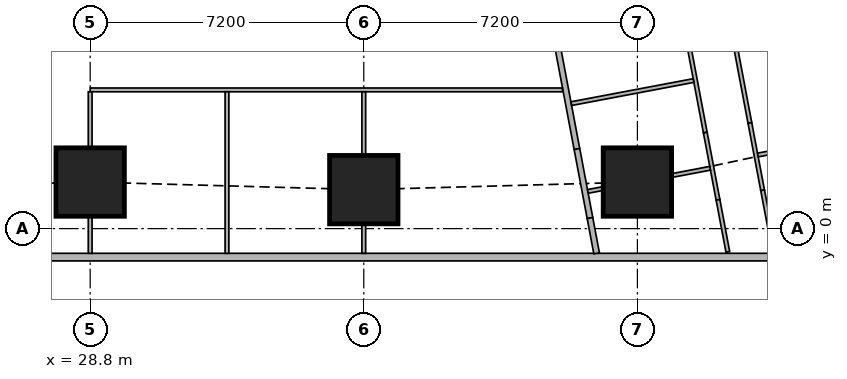
"""IFC4 building model, lengths in metres.
Left out: names, types, materials, properties, quantities, classifications, styles, units other than length and angle.
Written with IfcOpenShell. Run it as: python <this file> out.ifc"""

import sys

from ifc_helpers import new_model, si_unit, direction, frame, frame_2d, origin, origin_2d, place, context, subcontext, project, spatial, rectangle, extrude, element, fill, save


model = new_model("IFC4")
c1 = context("Model", 3, precision=1e-05, world=origin(), true_north=direction((0.0, 1.0)))
c2 = subcontext(c1, "Body", "Model", "MODEL_VIEW")
j1 = project(units=[si_unit("LENGTHUNIT", "METRE"), si_unit("PLANEANGLEUNIT", "RADIAN")], contexts=[c1])
p1 = place(None, origin())
s1 = spatial("IfcSite", under=j1, at=p1, CompositionType="ELEMENT")
p2 = place(p1, origin())
s2 = spatial("IfcBuilding", under=s1, at=p2, CompositionType="ELEMENT")
p3 = place(p2, frame((0.0, 0.0, 147.05)))
s3 = spatial("IfcBuildingStorey", under=s2, at=p3, CompositionType="ELEMENT", Elevation=147.05)
for number, where, z_axis, x_axis in (
    (1, (28.8, 1.225, 0.0), (0.0, 0.0, 1.0), (1.0, 0.0, 0.0)),
    (2, (36.0, 1.025, 0.0), (0.0, 0.0, 1.0), (1.0, 0.0, 0.0)),
    (3, (43.2, 1.225, 0.0), (0.0, 0.0, 1.0), (1.0, 0.0, 0.0)),
):
    element("IfcColumn", number, at=place(p3, frame(where, z_axis=z_axis, x_axis=x_axis)), inside=s3, PredefinedType="COLUMN", context=c2, shape_type="SweptSolid", body=[
        extrude(rectangle(XDim=1.8, YDim=1.8, at=origin_2d()), origin(), (0.0, 0.0, 1.0), 3.75),
    ])
p4 = place(p3, frame((2.163, -0.75, 0.0), z_axis=(0.0, 0.0, 1.0), x_axis=(1.0, 0.0, 0.0)))
e4 = element("IfcWall", 4, at=p4, inside=s3, PredefinedType="SOLIDWALL", context=c2, shape_type="SweptSolid", body=[
    extrude(rectangle(XDim=45.628, YDim=0.2, at=frame_2d((22.814, 0.0))), origin(), (0.0, 0.0, 1.0), 3.5),
])
p5 = place(p4, frame((9.537, 0.0, 0.9)))
e5 = element("IfcOpeningElement", 5, at=p5, cuts=e4, PredefinedType="OPENING", context=c2, shape_type="SweptSolid", body=[
    extrude(rectangle(XDim=1.8, YDim=1.5, at=frame_2d((0.9, 0.75))), frame((0.0, 0.11, 0.0), z_axis=(0.0, -1.0, 0.0), x_axis=(1.0, 0.0, 0.0)), (0.0, 0.0, 1.0), 0.22),
])
p6 = place(p4, frame((13.137, 0.0, 0.9)))
e6 = element("IfcOpeningElement", 6, at=p6, cuts=e4, PredefinedType="OPENING", context=c2, shape_type="SweptSolid", body=[
    extrude(rectangle(XDim=1.8, YDim=1.5, at=frame_2d((0.9, 0.75))), frame((0.0, 0.11, 0.0), z_axis=(0.0, -1.0, 0.0), x_axis=(1.0, 0.0, 0.0)), (0.0, 0.0, 1.0), 0.22),
])
p7 = place(p4, frame((16.737, 0.0, 0.9)))
e7 = element("IfcOpeningElement", 7, at=p7, cuts=e4, PredefinedType="OPENING", context=c2, shape_type="SweptSolid", body=[
    extrude(rectangle(XDim=1.8, YDim=1.5, at=frame_2d((0.9, 0.75))), frame((0.0, 0.11, 0.0), z_axis=(0.0, -1.0, 0.0), x_axis=(1.0, 0.0, 0.0)), (0.0, 0.0, 1.0), 0.22),
])
p8 = place(p4, frame((20.337, 0.0, 0.9)))
e8 = element("IfcOpeningElement", 8, at=p8, cuts=e4, PredefinedType="OPENING", context=c2, shape_type="SweptSolid", body=[
    extrude(rectangle(XDim=1.8, YDim=1.5, at=frame_2d((0.9, 0.75))), frame((0.0, 0.11, 0.0), z_axis=(0.0, -1.0, 0.0), x_axis=(1.0, 0.0, 0.0)), (0.0, 0.0, 1.0), 0.22),
])
p9 = place(p4, frame((23.937, 0.0, 0.9)))
e9 = element("IfcOpeningElement", 9, at=p9, cuts=e4, PredefinedType="OPENING", context=c2, shape_type="SweptSolid", body=[
    extrude(rectangle(XDim=1.8, YDim=1.5, at=frame_2d((0.9, 0.75))), frame((0.0, 0.11, 0.0), z_axis=(0.0, -1.0, 0.0), x_axis=(1.0, 0.0, 0.0)), (0.0, 0.0, 1.0), 0.22),
])
p10 = place(p4, frame((27.537, 0.0, 0.9)))
e10 = element("IfcOpeningElement", 10, at=p10, cuts=e4, PredefinedType="OPENING", context=c2, shape_type="SweptSolid", body=[
    extrude(rectangle(XDim=1.8, YDim=1.5, at=frame_2d((0.9, 0.75))), frame((0.0, 0.11, 0.0), z_axis=(0.0, -1.0, 0.0), x_axis=(1.0, 0.0, 0.0)), (0.0, 0.0, 1.0), 0.22),
])
p11 = place(p4, frame((31.137, 0.0, 0.9)))
e11 = element("IfcOpeningElement", 11, at=p11, cuts=e4, PredefinedType="OPENING", context=c2, shape_type="SweptSolid", body=[
    extrude(rectangle(XDim=1.8, YDim=1.5, at=frame_2d((0.9, 0.75))), frame((0.0, 0.11, 0.0), z_axis=(0.0, -1.0, 0.0), x_axis=(1.0, 0.0, 0.0)), (0.0, 0.0, 1.0), 0.22),
])
p12 = place(p4, frame((34.737, 0.0, 0.9)))
e12 = element("IfcOpeningElement", 12, at=p12, cuts=e4, PredefinedType="OPENING", context=c2, shape_type="SweptSolid", body=[
    extrude(rectangle(XDim=1.8, YDim=1.5, at=frame_2d((0.9, 0.75))), frame((0.0, 0.11, 0.0), z_axis=(0.0, -1.0, 0.0), x_axis=(1.0, 0.0, 0.0)), (0.0, 0.0, 1.0), 0.22),
])
p13 = place(p3, frame((50.653, 2.703, 0.0), z_axis=(0.0, 0.0, 1.0), x_axis=(-0.185612026696, 0.982623109613, 0.0)))
e13 = element("IfcWall", 13, at=p13, inside=s3, PredefinedType="SOLIDWALL", context=c2, shape_type="SweptSolid", body=[
    extrude(rectangle(XDim=41.393, YDim=0.2, at=frame_2d((20.697, 0.0))), origin(), (0.0, 0.0, 1.0), 3.5),
])
p14 = place(p13, frame((1.633, 0.0, 0.9)))
e14 = element("IfcOpeningElement", 14, at=p14, cuts=e13, PredefinedType="OPENING", context=c2, shape_type="SweptSolid", body=[
    extrude(rectangle(XDim=1.8, YDim=1.5, at=frame_2d((0.9, 0.75))), frame((0.0, 0.11, 0.0), z_axis=(0.0, -1.0, 0.0), x_axis=(1.0, 0.0, 0.0)), (0.0, 0.0, 1.0), 0.22),
])
p15 = place(p13, frame((6.032, 0.0, 0.9)))
e15 = element("IfcOpeningElement", 15, at=p15, cuts=e13, PredefinedType="OPENING", context=c2, shape_type="SweptSolid", body=[
    extrude(rectangle(XDim=1.8, YDim=1.5, at=frame_2d((0.9, 0.75))), frame((0.0, 0.11, 0.0), z_axis=(0.0, -1.0, 0.0), x_axis=(1.0, 0.0, 0.0)), (0.0, 0.0, 1.0), 0.22),
])
p16 = place(p13, frame((9.848, 0.0, 0.9)))
e16 = element("IfcOpeningElement", 16, at=p16, cuts=e13, PredefinedType="OPENING", context=c2, shape_type="SweptSolid", body=[
    extrude(rectangle(XDim=1.8, YDim=1.5, at=frame_2d((0.9, 0.75))), frame((0.0, 0.11, 0.0), z_axis=(0.0, -1.0, 0.0), x_axis=(1.0, 0.0, 0.0)), (0.0, 0.0, 1.0), 0.22),
])
p17 = place(p13, frame((13.664, 0.0, 0.9)))
e17 = element("IfcOpeningElement", 17, at=p17, cuts=e13, PredefinedType="OPENING", context=c2, shape_type="SweptSolid", body=[
    extrude(rectangle(XDim=1.8, YDim=1.5, at=frame_2d((0.9, 0.75))), frame((0.0, 0.11, 0.0), z_axis=(0.0, -1.0, 0.0), x_axis=(1.0, 0.0, 0.0)), (0.0, 0.0, 1.0), 0.22),
])
p18 = place(p13, frame((17.481, 0.0, 0.9)))
e18 = element("IfcOpeningElement", 18, at=p18, cuts=e13, PredefinedType="OPENING", context=c2, shape_type="SweptSolid", body=[
    extrude(rectangle(XDim=1.8, YDim=1.5, at=frame_2d((0.9, 0.75))), frame((0.0, 0.11, 0.0), z_axis=(0.0, -1.0, 0.0), x_axis=(1.0, 0.0, 0.0)), (0.0, 0.0, 1.0), 0.22),
])
p19 = place(p13, frame((21.297, 0.0, 0.9)))
e19 = element("IfcOpeningElement", 19, at=p19, cuts=e13, PredefinedType="OPENING", context=c2, shape_type="SweptSolid", body=[
    extrude(rectangle(XDim=1.8, YDim=1.5, at=frame_2d((0.9, 0.75))), frame((0.0, 0.11, 0.0), z_axis=(0.0, -1.0, 0.0), x_axis=(1.0, 0.0, 0.0)), (0.0, 0.0, 1.0), 0.22),
])
p20 = place(p13, frame((25.113, 0.0, 0.9)))
e20 = element("IfcOpeningElement", 20, at=p20, cuts=e13, PredefinedType="OPENING", context=c2, shape_type="SweptSolid", body=[
    extrude(rectangle(XDim=1.8, YDim=1.5, at=frame_2d((0.9, 0.75))), frame((0.0, 0.11, 0.0), z_axis=(0.0, -1.0, 0.0), x_axis=(1.0, 0.0, 0.0)), (0.0, 0.0, 1.0), 0.22),
])
p21 = place(p13, frame((28.93, 0.0, 0.9)))
e21 = element("IfcOpeningElement", 21, at=p21, cuts=e13, PredefinedType="OPENING", context=c2, shape_type="SweptSolid", body=[
    extrude(rectangle(XDim=1.8, YDim=1.5, at=frame_2d((0.9, 0.75))), frame((0.0, 0.11, 0.0), z_axis=(0.0, -1.0, 0.0), x_axis=(1.0, 0.0, 0.0)), (0.0, 0.0, 1.0), 0.22),
])
p22 = place(p13, frame((32.746, 0.0, 0.9)))
e22 = element("IfcOpeningElement", 22, at=p22, cuts=e13, PredefinedType="OPENING", context=c2, shape_type="SweptSolid", body=[
    extrude(rectangle(XDim=1.8, YDim=1.5, at=frame_2d((0.9, 0.75))), frame((0.0, 0.11, 0.0), z_axis=(0.0, -1.0, 0.0), x_axis=(1.0, 0.0, 0.0)), (0.0, 0.0, 1.0), 0.22),
])
p23 = place(p13, frame((36.481, 0.0, 0.9)))
e23 = element("IfcOpeningElement", 23, at=p23, cuts=e13, PredefinedType="OPENING", context=c2, shape_type="SweptSolid", body=[
    extrude(rectangle(XDim=1.8, YDim=1.5, at=frame_2d((0.9, 0.75))), frame((0.0, 0.11, 0.0), z_axis=(0.0, -1.0, 0.0), x_axis=(1.0, 0.0, 0.0)), (0.0, 0.0, 1.0), 0.22),
])
p24 = place(p3, frame((33.877, 43.029, 0.0), z_axis=(0.0, 0.0, 1.0), x_axis=(0.185596841028, -0.98262597798, 0.0)))
e24 = element("IfcWall", 24, at=p24, inside=s3, PredefinedType="SOLIDWALL", context=c2, shape_type="SweptSolid", body=[
    extrude(rectangle(XDim=41.66, YDim=0.15, at=frame_2d((20.83, 0.0))), origin(), (0.0, 0.0, 1.0), 2.5),
])
p25 = place(p24, frame((12.57, 0.0, 0.0)))
e25 = element("IfcOpeningElement", 25, at=p25, cuts=e24, PredefinedType="OPENING", context=c2, shape_type="SweptSolid", body=[
    extrude(rectangle(XDim=1.0, YDim=2.1, at=frame_2d((0.5, 1.05))), frame((0.0, 0.085, 0.0), z_axis=(0.0, -1.0, 0.0), x_axis=(1.0, 0.0, 0.0)), (0.0, 0.0, 1.0), 0.17),
])
p26 = place(p24, frame((16.386, 0.0, 0.0)))
e26 = element("IfcOpeningElement", 26, at=p26, cuts=e24, PredefinedType="OPENING", context=c2, shape_type="SweptSolid", body=[
    extrude(rectangle(XDim=1.0, YDim=2.1, at=frame_2d((0.5, 1.05))), frame((0.0, 0.085, 0.0), z_axis=(0.0, -1.0, 0.0), x_axis=(1.0, 0.0, 0.0)), (0.0, 0.0, 1.0), 0.17),
])
p27 = place(p24, frame((31.166, 0.0, 0.0)))
e27 = element("IfcOpeningElement", 27, at=p27, cuts=e24, PredefinedType="OPENING", context=c2, shape_type="SweptSolid", body=[
    extrude(rectangle(XDim=1.0, YDim=2.1, at=frame_2d((0.5, 1.05))), frame((0.0, 0.085, 0.0), z_axis=(0.0, -1.0, 0.0), x_axis=(1.0, 0.0, 0.0)), (0.0, 0.0, 1.0), 0.17),
])
p28 = place(p3, frame((41.609, 2.093, 0.0), z_axis=(0.0, 0.0, 1.0), x_axis=(0.185708872674, -0.982604811005, 0.0)))
e28 = element("IfcWall", 28, at=p28, inside=s3, PredefinedType="SOLIDWALL", context=c2, shape_type="SweptSolid", body=[
    extrude(rectangle(XDim=1.847, YDim=0.15, at=frame_2d((0.924, 0.0))), origin(), (0.0, 0.0, 1.0), 2.1),
])
p29 = place(p3, frame((41.952, 0.278, 0.0), z_axis=(0.0, 0.0, 1.0), x_axis=(0.185365466984, -0.982669651332, 0.0)))
e29 = element("IfcWall", 29, at=p29, inside=s3, PredefinedType="SOLIDWALL", context=c2, shape_type="SweptSolid", body=[
    extrude(rectangle(XDim=0.944, YDim=0.15, at=frame_2d((0.472, 0.0))), origin(), (0.0, 0.0, 1.0), 3.5),
])
p30 = place(p3, frame((41.229, 3.65, 0.0), z_axis=(0.0, 0.0, 1.0), x_axis=(-1.0, 0.0, 0.0)))
e30 = element("IfcWall", 30, at=p30, inside=s3, PredefinedType="PARTITIONING", context=c2, shape_type="SweptSolid", body=[
    extrude(rectangle(XDim=12.429, YDim=0.1, at=frame_2d((6.214, 0.0))), origin(), (0.0, 0.0, 1.0), 3.5),
])
p31 = place(p30, frame((11.329, 0.0, 0.0)))
e31 = element("IfcOpeningElement", 31, at=p31, cuts=e30, PredefinedType="OPENING", context=c2, shape_type="SweptSolid", body=[
    extrude(rectangle(XDim=0.9, YDim=2.1, at=frame_2d((0.45, 1.05))), frame((0.0, 0.06, 0.0), z_axis=(0.0, -1.0, 0.0), x_axis=(1.0, 0.0, 0.0)), (0.0, 0.0, 1.0), 0.12),
])
p32 = place(p30, frame((7.729, 0.0, 0.0)))
e32 = element("IfcOpeningElement", 32, at=p32, cuts=e30, PredefinedType="OPENING", context=c2, shape_type="SweptSolid", body=[
    extrude(rectangle(XDim=0.9, YDim=2.1, at=frame_2d((0.45, 1.05))), frame((0.0, 0.06, 0.0), z_axis=(0.0, -1.0, 0.0), x_axis=(1.0, 0.0, 0.0)), (0.0, 0.0, 1.0), 0.12),
])
p33 = place(p30, frame((4.129, 0.0, 0.0)))
e33 = element("IfcOpeningElement", 33, at=p33, cuts=e30, PredefinedType="OPENING", context=c2, shape_type="SweptSolid", body=[
    extrude(rectangle(XDim=0.9, YDim=2.1, at=frame_2d((0.45, 1.05))), frame((0.0, 0.06, 0.0), z_axis=(0.0, -1.0, 0.0), x_axis=(1.0, 0.0, 0.0)), (0.0, 0.0, 1.0), 0.12),
])
p34 = place(p3, frame((28.8, -0.65, 0.0), z_axis=(0.0, 0.0, 1.0), x_axis=(0.0, 1.0, 0.0)))
e34 = element("IfcWall", 34, at=p34, inside=s3, PredefinedType="PARTITIONING", context=c2, shape_type="SweptSolid", body=[
    extrude(rectangle(XDim=0.974, YDim=0.1, at=frame_2d((0.487, 0.0))), origin(), (0.0, 0.0, 1.0), 3.5),
])
p35 = place(p3, frame((28.8, 2.126, 0.0), z_axis=(0.0, 0.0, 1.0), x_axis=(0.0, 1.0, 0.0)))
e35 = element("IfcWall", 35, at=p35, inside=s3, PredefinedType="PARTITIONING", context=c2, shape_type="SweptSolid", body=[
    extrude(rectangle(XDim=1.474, YDim=0.1, at=frame_2d((0.737, 0.0))), origin(), (0.0, 0.0, 1.0), 3.5),
])
p36 = place(p3, frame((32.4, -0.65, 0.0), z_axis=(0.0, 0.0, 1.0), x_axis=(0.0, 1.0, 0.0)))
e36 = element("IfcWall", 36, at=p36, inside=s3, PredefinedType="PARTITIONING", context=c2, shape_type="SweptSolid", body=[
    extrude(rectangle(XDim=4.25, YDim=0.1, at=frame_2d((2.125, 0.0))), origin(), (0.0, 0.0, 1.0), 2.1),
])
p37 = place(p3, frame((36.0, -0.65, 0.0), z_axis=(0.0, 0.0, 1.0), x_axis=(0.0, 1.0, 0.0)))
e37 = element("IfcWall", 37, at=p37, inside=s3, PredefinedType="PARTITIONING", context=c2, shape_type="SweptSolid", body=[
    extrude(rectangle(XDim=0.774, YDim=0.1, at=frame_2d((0.387, 0.0))), origin(), (0.0, 0.0, 1.0), 3.5),
])
p38 = place(p3, frame((36.0, 1.926, 0.0), z_axis=(0.0, 0.0, 1.0), x_axis=(0.0, 1.0, 0.0)))
e38 = element("IfcWall", 38, at=p38, inside=s3, PredefinedType="PARTITIONING", context=c2, shape_type="SweptSolid", body=[
    extrude(rectangle(XDim=1.674, YDim=0.1, at=frame_2d((0.837, 0.0))), origin(), (0.0, 0.0, 1.0), 3.5),
])
p39 = place(p3, frame((44.727, 10.366, 0.0), z_axis=(0.0, 0.0, 1.0), x_axis=(0.185578957652, -0.982629355595, 0.0)))
e39 = element("IfcWall", 39, at=p39, inside=s3, PredefinedType="PARTITIONING", context=c2, shape_type="SweptSolid", body=[
    extrude(rectangle(XDim=7.721, YDim=0.1, at=frame_2d((3.86, 0.0))), origin(), (0.0, 0.0, 1.0), 3.5),
])
p40 = place(p39, frame((0.151, 0.0, 0.0)))
e40 = element("IfcOpeningElement", 40, at=p40, cuts=e39, PredefinedType="OPENING", context=c2, shape_type="SweptSolid", body=[
    extrude(rectangle(XDim=0.9, YDim=2.1, at=frame_2d((0.45, 1.05))), frame((0.0, 0.06, 0.0), z_axis=(0.0, -1.0, 0.0), x_axis=(1.0, 0.0, 0.0)), (0.0, 0.0, 1.0), 0.12),
])
p41 = place(p39, frame((3.806, 0.0, 0.0)))
e41 = element("IfcOpeningElement", 41, at=p41, cuts=e39, PredefinedType="OPENING", context=c2, shape_type="SweptSolid", body=[
    extrude(rectangle(XDim=0.9, YDim=2.1, at=frame_2d((0.45, 1.05))), frame((0.0, 0.06, 0.0), z_axis=(0.0, -1.0, 0.0), x_axis=(1.0, 0.0, 0.0)), (0.0, 0.0, 1.0), 0.12),
])
p42 = place(p3, frame((46.16, 2.779, 0.0), z_axis=(0.0, 0.0, 1.0), x_axis=(0.18597295662, -0.982554863306, 0.0)))
e42 = element("IfcWall", 42, at=p42, inside=s3, PredefinedType="PARTITIONING", context=c2, shape_type="SweptSolid", body=[
    extrude(rectangle(XDim=1.802, YDim=0.1, at=frame_2d((0.901, 0.0))), origin(), (0.0, 0.0, 1.0), 2.1),
])
p43 = place(p3, frame((46.495, 1.008, 0.0), z_axis=(0.0, 0.0, 1.0), x_axis=(0.185535059532, -0.982637645159, 0.0)))
e43 = element("IfcWall", 43, at=p43, inside=s3, PredefinedType="PARTITIONING", context=c2, shape_type="SweptSolid", body=[
    extrude(rectangle(XDim=1.644, YDim=0.1, at=frame_2d((0.822, 0.0))), origin(), (0.0, 0.0, 1.0), 3.5),
])
p44 = place(p3, frame((43.999, 7.755, 0.0), z_axis=(0.0, 0.0, 1.0), x_axis=(0.185565904578, -0.982631820703, 0.0)))
e44 = element("IfcWall", 44, at=p44, inside=s3, PredefinedType="PARTITIONING", context=c2, shape_type="SweptSolid", body=[
    extrude(rectangle(XDim=5.319, YDim=0.1, at=frame_2d((2.66, 0.0))), origin(), (0.0, 0.0, 1.0), 3.5),
])
p45 = place(p44, frame((1.0, 0.0, 0.0)))
e45 = element("IfcOpeningElement", 45, at=p45, cuts=e44, PredefinedType="OPENING", context=c2, shape_type="SweptSolid", body=[
    extrude(rectangle(XDim=0.9, YDim=2.1, at=frame_2d((0.45, 1.05))), frame((0.0, 0.06, 0.0), z_axis=(0.0, -1.0, 0.0), x_axis=(1.0, 0.0, 0.0)), (0.0, 0.0, 1.0), 0.12),
])
p46 = place(p44, frame((4.269, 0.0, 0.0)))
e46 = element("IfcOpeningElement", 46, at=p46, cuts=e44, PredefinedType="OPENING", context=c2, shape_type="SweptSolid", body=[
    extrude(rectangle(XDim=0.9, YDim=2.1, at=frame_2d((0.45, 1.05))), frame((0.0, 0.06, 0.0), z_axis=(0.0, -1.0, 0.0), x_axis=(1.0, 0.0, 0.0)), (0.0, 0.0, 1.0), 0.12),
])
p47 = place(p44, frame((2.665, 0.0, 0.0)))
e47 = element("IfcOpeningElement", 47, at=p47, cuts=e44, PredefinedType="OPENING", context=c2, shape_type="SweptSolid", body=[
    extrude(rectangle(XDim=0.9, YDim=2.1, at=frame_2d((0.45, 1.05))), frame((0.0, 0.06, 0.0), z_axis=(0.0, -1.0, 0.0), x_axis=(1.0, 0.0, 0.0)), (0.0, 0.0, 1.0), 0.12),
])
p48 = place(p3, frame((44.986, 2.528, 0.0), z_axis=(0.0, 0.0, 1.0), x_axis=(0.18584218627, -0.982579605835, 0.0)))
e48 = element("IfcWall", 48, at=p48, inside=s3, PredefinedType="PARTITIONING", context=c2, shape_type="SweptSolid", body=[
    extrude(rectangle(XDim=1.802, YDim=0.1, at=frame_2d((0.901, 0.0))), origin(), (0.0, 0.0, 1.0), 2.1),
])
p49 = place(p3, frame((45.321, 0.757, 0.0), z_axis=(0.0, 0.0, 1.0), x_axis=(0.185640562635, -0.982617718904, 0.0)))
e49 = element("IfcWall", 49, at=p49, inside=s3, PredefinedType="PARTITIONING", context=c2, shape_type="SweptSolid", body=[
    extrude(rectangle(XDim=1.395, YDim=0.1, at=frame_2d((0.698, 0.0))), origin(), (0.0, 0.0, 1.0), 3.5),
])
p50 = place(p49, frame((0.15, 0.0, 0.0)))
e50 = element("IfcOpeningElement", 50, at=p50, cuts=e49, PredefinedType="OPENING", context=c2, shape_type="SweptSolid", body=[
    extrude(rectangle(XDim=0.9, YDim=2.1, at=frame_2d((0.45, 1.05))), frame((0.0, 0.06, 0.0), z_axis=(0.0, -1.0, 0.0), x_axis=(1.0, 0.0, 0.0)), (0.0, 0.0, 1.0), 0.12),
])
p51 = place(p3, frame((46.738, 2.006, 0.0), z_axis=(0.0, 0.0, 1.0), x_axis=(-0.982820466874, -0.184564161994, 0.0)))
e51 = element("IfcWall", 51, at=p51, inside=s3, PredefinedType="PARTITIONING", context=c2, shape_type="SweptSolid", body=[
    extrude(rectangle(XDim=0.374, YDim=0.1, at=frame_2d((0.187, 0.0))), origin(), (0.0, 0.0, 1.0), 2.1),
])
p52 = place(p3, frame((45.114, 1.587, 0.0), z_axis=(0.0, 0.0, 1.0), x_axis=(-0.982567886437, -0.185904138047, 0.0)))
e52 = element("IfcWall", 52, at=p52, inside=s3, PredefinedType="PARTITIONING", context=c2, shape_type="SweptSolid", body=[
    extrude(rectangle(XDim=1.022, YDim=0.1, at=frame_2d((0.511, 0.0))), origin(), (0.0, 0.0, 1.0), 2.1),
])
p53 = place(p3, frame((42.29, 1.053, 0.0), z_axis=(0.0, 0.0, 1.0), x_axis=(-0.982830800147, -0.184509127909, 0.0)))
e53 = element("IfcWall", 53, at=p53, inside=s3, PredefinedType="PARTITIONING", context=c2, shape_type="SweptSolid", body=[
    extrude(rectangle(XDim=0.401, YDim=0.1, at=frame_2d((0.2, 0.0))), origin(), (0.0, 0.0, 1.0), 2.1),
])
p54 = place(p3, frame((44.677, 3.896, 0.0), z_axis=(0.0, 0.0, 1.0), x_axis=(-0.982610347627, -0.185679575441, 0.0)))
e54 = element("IfcWall", 54, at=p54, inside=s3, PredefinedType="PARTITIONING", context=c2, shape_type="SweptSolid", body=[
    extrude(rectangle(XDim=3.274, YDim=0.1, at=frame_2d((1.637, 0.0))), origin(), (0.0, 0.0, 1.0), 3.5),
])
p55 = place(p9, origin())
e55 = element("IfcWindow", 55, at=p55, inside=s3, PartitioningType="SINGLE_PANEL", PredefinedType="WINDOW", context=c2, shape_type="SweptSolid", body=[
    extrude(rectangle(XDim=1.8, YDim=1.5, at=frame_2d((0.9, 0.75))), frame((0.0, 0.03, 0.0), z_axis=(0.0, -1.0, 0.0), x_axis=(1.0, 0.0, 0.0)), (0.0, 0.0, 1.0), 0.06),
])
fill(e9, e55)
p56 = place(p10, origin())
e56 = element("IfcWindow", 56, at=p56, inside=s3, PartitioningType="SINGLE_PANEL", PredefinedType="WINDOW", context=c2, shape_type="SweptSolid", body=[
    extrude(rectangle(XDim=1.8, YDim=1.5, at=frame_2d((0.9, 0.75))), frame((0.0, 0.03, 0.0), z_axis=(0.0, -1.0, 0.0), x_axis=(1.0, 0.0, 0.0)), (0.0, 0.0, 1.0), 0.06),
])
fill(e10, e56)
p57 = place(p11, origin())
e57 = element("IfcWindow", 57, at=p57, inside=s3, PartitioningType="SINGLE_PANEL", PredefinedType="WINDOW", context=c2, shape_type="SweptSolid", body=[
    extrude(rectangle(XDim=1.8, YDim=1.5, at=frame_2d((0.9, 0.75))), frame((0.0, 0.03, 0.0), z_axis=(0.0, -1.0, 0.0), x_axis=(1.0, 0.0, 0.0)), (0.0, 0.0, 1.0), 0.06),
])
fill(e11, e57)
p58 = place(p12, origin())
e58 = element("IfcWindow", 58, at=p58, inside=s3, PartitioningType="SINGLE_PANEL", PredefinedType="WINDOW", context=c2, shape_type="SweptSolid", body=[
    extrude(rectangle(XDim=1.8, YDim=1.5, at=frame_2d((0.9, 0.75))), frame((0.0, 0.03, 0.0), z_axis=(0.0, -1.0, 0.0), x_axis=(1.0, 0.0, 0.0)), (0.0, 0.0, 1.0), 0.06),
])
fill(e12, e58)
p59 = place(p31, origin())
e59 = element("IfcDoor", 59, at=p59, inside=s3, OperationType="SINGLE_SWING_RIGHT", PredefinedType="DOOR", context=c2, shape_type="SweptSolid", body=[
    extrude(rectangle(XDim=0.9, YDim=2.1, at=frame_2d((0.45, 1.05))), frame((0.0, 0.025, 0.0), z_axis=(0.0, -1.0, 0.0), x_axis=(1.0, 0.0, 0.0)), (0.0, 0.0, 1.0), 0.05),
])
fill(e31, e59)
p60 = place(p32, origin())
e60 = element("IfcDoor", 60, at=p60, inside=s3, OperationType="SINGLE_SWING_RIGHT", PredefinedType="DOOR", context=c2, shape_type="SweptSolid", body=[
    extrude(rectangle(XDim=0.9, YDim=2.1, at=frame_2d((0.45, 1.05))), frame((0.0, 0.025, 0.0), z_axis=(0.0, -1.0, 0.0), x_axis=(1.0, 0.0, 0.0)), (0.0, 0.0, 1.0), 0.05),
])
fill(e32, e60)
p61 = place(p33, origin())
e61 = element("IfcDoor", 61, at=p61, inside=s3, OperationType="SINGLE_SWING_RIGHT", PredefinedType="DOOR", context=c2, shape_type="SweptSolid", body=[
    extrude(rectangle(XDim=0.9, YDim=2.1, at=frame_2d((0.45, 1.05))), frame((0.0, 0.025, 0.0), z_axis=(0.0, -1.0, 0.0), x_axis=(1.0, 0.0, 0.0)), (0.0, 0.0, 1.0), 0.05),
])
fill(e33, e61)
p62 = place(p46, origin())
e62 = element("IfcDoor", 62, at=p62, inside=s3, OperationType="SINGLE_SWING_LEFT", PredefinedType="DOOR", context=c2, shape_type="SweptSolid", body=[
    extrude(rectangle(XDim=0.9, YDim=2.1, at=frame_2d((0.45, 1.05))), frame((0.0, 0.025, 0.0), z_axis=(0.0, -1.0, 0.0), x_axis=(1.0, 0.0, 0.0)), (0.0, 0.0, 1.0), 0.05),
])
fill(e46, e62)
p63 = place(p50, origin())
e63 = element("IfcDoor", 63, at=p63, inside=s3, OperationType="SINGLE_SWING_RIGHT", PredefinedType="DOOR", context=c2, shape_type="SweptSolid", body=[
    extrude(rectangle(XDim=0.9, YDim=2.1, at=frame_2d((0.45, 1.05))), frame((0.0, 0.025, 0.0), z_axis=(0.0, -1.0, 0.0), x_axis=(1.0, 0.0, 0.0)), (0.0, 0.0, 1.0), 0.05),
])
fill(e50, e63)
p64 = place(p47, origin())
e64 = element("IfcDoor", 64, at=p64, inside=s3, OperationType="SINGLE_SWING_RIGHT", PredefinedType="DOOR", context=c2, shape_type="SweptSolid", body=[
    extrude(rectangle(XDim=0.9, YDim=2.1, at=frame_2d((0.45, 1.05))), frame((0.0, 0.025, 0.0), z_axis=(0.0, -1.0, 0.0), x_axis=(1.0, 0.0, 0.0)), (0.0, 0.0, 1.0), 0.05),
])
fill(e47, e64)
save(model, sys.argv[1])
